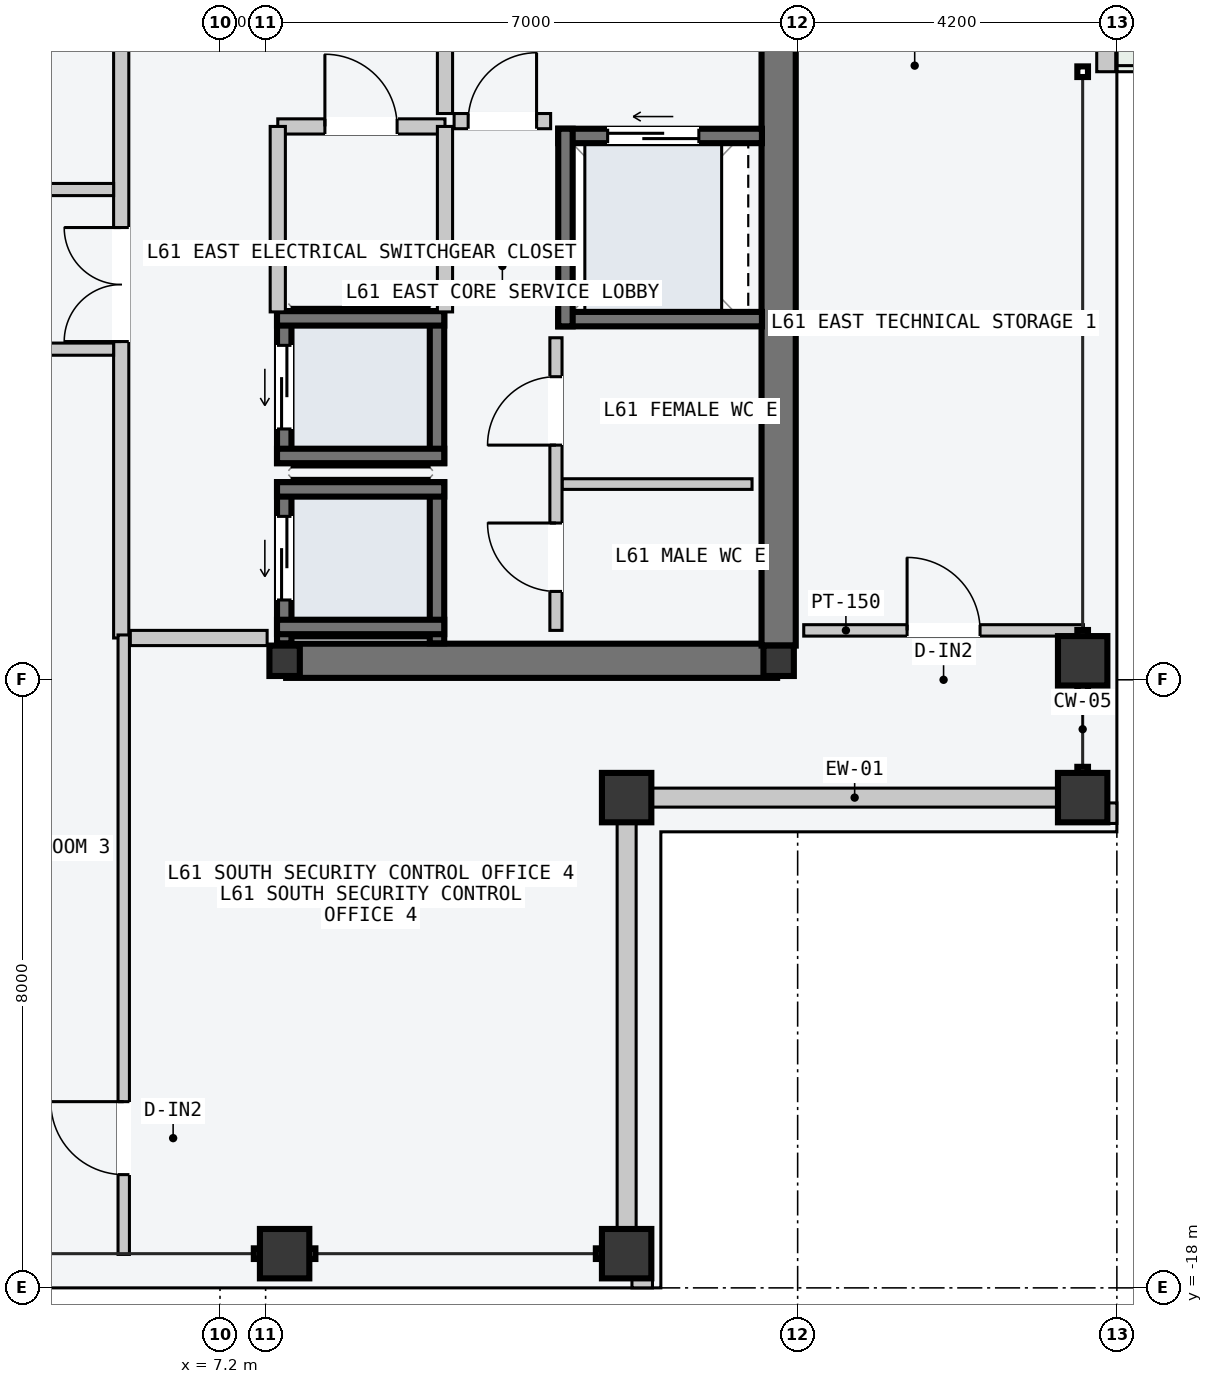
"""IFC4 building model, lengths in metres.
Left out: names, types, materials, properties, quantities, classifications, styles, units other than length and angle.
Written with IfcOpenShell. Run it as: python <this file> out.ifc"""

import sys

from ifc_helpers import new_model, si_unit, direction, frame, frame_2d, origin, origin_2d, place, context, subcontext, project, spatial, rectangle, hollow_rectangle, i_section, extrude, element, fill, save


model = new_model("IFC4")
c1 = context("Model", 3, precision=1e-05, world=origin(), true_north=direction((0.0, 1.0)))
c2 = subcontext(c1, "Body", "Model", "MODEL_VIEW")
j1 = project(units=[si_unit("LENGTHUNIT", "METRE"), si_unit("PLANEANGLEUNIT", "RADIAN")], contexts=[c1])
p1 = place(None, origin())
s1 = spatial("IfcSite", under=j1, at=p1, CompositionType="ELEMENT")
p2 = place(p1, origin())
s2 = spatial("IfcBuilding", under=s1, at=p2, CompositionType="ELEMENT")
p3 = place(p2, frame((0.0, 0.0, 232.8)))
s3 = spatial("IfcBuildingStorey", under=s2, at=p3, CompositionType="ELEMENT", Elevation=232.8)
p4 = place(p3, frame((8.07, -9.75, -0.2), z_axis=(0.0, 0.0, 1.0), x_axis=(1.0, 0.0, 0.0)))
e1 = element("IfcWall", 1, at=p4, inside=s3, PredefinedType="SHEAR", context=c2, shape_type="SweptSolid", body=[
    extrude(rectangle(XDim=6.46, YDim=0.45, at=frame_2d((3.23, 0.0))), origin(), (0.0, 0.0, 1.0), 3.6),
])
p5 = place(p3, frame((14.55, -9.55, -0.2), z_axis=(0.0, 0.0, 1.0), x_axis=(0.0, 1.0, 0.0)))
e2 = element("IfcWall", 2, at=p5, inside=s3, PredefinedType="SHEAR", context=c2, shape_type="SweptSolid", body=[
    extrude(rectangle(XDim=9.35, YDim=0.45, at=frame_2d((4.675, 0.0))), origin(), (0.0, 0.0, 1.0), 3.6),
])
for number, where, z_axis, x_axis in (
    (3, (8.05, -9.75, 0.0), (0.0, 0.0, 1.0), (1.0, 0.0, 0.0)),
    (4, (14.55, -9.75, 0.0), (0.0, 0.0, 1.0), (1.0, 0.0, 0.0)),
):
    element("IfcColumn", number, at=place(p3, frame(where, z_axis=z_axis, x_axis=x_axis)), inside=s3, PredefinedType="COLUMN", context=c2, shape_type="SweptSolid", body=[
        extrude(i_section(OverallWidth=0.4, OverallDepth=0.4, WebThickness=0.013, FlangeThickness=0.021, at=origin_2d()), origin(), (0.0, 0.0, 1.0), 3.6),
    ])
for number, where, z_axis, x_axis in (
    (5, (8.05, -17.55, 0.0), (0.0, 0.0, 1.0), (1.0, 0.0, 0.0)),
    (6, (12.55, -17.55, 0.0), (0.0, 0.0, 1.0), (1.0, 0.0, 0.0)),
    (7, (18.55, -11.55, 0.0), (0.0, 0.0, 1.0), (0.0, 1.0, 0.0)),
    (8, (18.55, -9.75, 0.0), (0.0, 0.0, 1.0), (0.0, 1.0, 0.0)),
    (9, (12.55, -11.55, 0.0), (0.0, 0.0, 1.0), (1.0, 0.0, 0.0)),
):
    element("IfcColumn", number, at=place(p3, frame(where, z_axis=z_axis, x_axis=x_axis)), inside=s3, PredefinedType="COLUMN", context=c2, shape_type="SweptSolid", body=[
        extrude(hollow_rectangle(XDim=0.65, YDim=0.65, WallThickness=0.028, at=origin_2d()), origin(), (0.0, 0.0, 1.0), 3.6),
    ])
p6 = place(p3, frame((18.86, -2.0, 0.0), z_axis=(0.0, 0.0, 1.0), x_axis=(0.0, 1.0, 0.0)))
e10 = element("IfcWall", 10, at=p6, inside=s3, PredefinedType="STANDARD", context=c2, shape_type="SweptSolid", body=[
    extrude(rectangle(XDim=10.8, YDim=0.25, at=frame_2d((5.4, 0.0))), origin(), (0.0, 0.0, 1.0), 3.4),
])
p7 = place(p6, frame((6.6, 0.0, 0.0)))
e11 = element("IfcOpeningElement", 11, at=p7, cuts=e10, PredefinedType="OPENING", context=c2, shape_type="SweptSolid", body=[
    extrude(rectangle(XDim=1.6, YDim=2.2, at=frame_2d((0.8, 1.1))), frame((0.0, 0.135, 0.0), z_axis=(0.0, -1.0, 0.0), x_axis=(1.0, 0.0, 0.0)), (0.0, 0.0, 1.0), 0.27),
])
p8 = place(p6, frame((1.4, 0.0, 0.85)))
e12 = element("IfcOpeningElement", 12, at=p8, cuts=e10, PredefinedType="OPENING", context=c2, shape_type="SweptSolid", body=[
    extrude(rectangle(XDim=1.8, YDim=2.05, at=frame_2d((0.9, 1.025))), frame((0.0, 0.135, 0.0), z_axis=(0.0, -1.0, 0.0), x_axis=(1.0, 0.0, 0.0)), (0.0, 0.0, 1.0), 0.27),
])
for number, where, z_axis, x_axis in (
    (13, (12.885, -11.55, 0.0), (0.0, 0.0, 1.0), (1.0, 0.0, 0.0)),
    (14, (12.55, -17.215, 0.0), (0.0, 0.0, 1.0), (0.0, 1.0, 0.0)),
):
    element("IfcWall", number, at=place(p3, frame(where, z_axis=z_axis, x_axis=x_axis)), inside=s3, PredefinedType="STANDARD", context=c2, shape_type="SweptSolid", body=[
        extrude(rectangle(XDim=5.33, YDim=0.25, at=frame_2d((2.665, 0.0))), origin(), (0.0, 0.0, 1.0), 2.85),
    ])
for number, where, z_axis, x_axis in (
    (15, (12.62, -17.89, 0.0), (0.0, 0.0, 1.0), (1.0, 0.0, 0.0)),
    (16, (18.89, -11.89, 0.0), (0.0, 0.0, 1.0), (0.0, 1.0, 0.0)),
):
    element("IfcWall", number, at=place(p3, frame(where, z_axis=z_axis, x_axis=x_axis)), inside=s3, PredefinedType="PARAPET", context=c2, shape_type="SweptSolid", body=[
        extrude(rectangle(XDim=0.27, YDim=0.22, at=frame_2d((0.135, 0.0))), origin(), (0.0, 0.0, 1.0), 1.2),
    ])
p9 = place(p3, frame((8.045, -9.52, -0.2), z_axis=(0.0, 0.0, 1.0), x_axis=(0.0, 1.0, 0.0)))
e17 = element("IfcWall", 17, at=p9, inside=s3, PredefinedType="SOLIDWALL", context=c2, shape_type="SweptSolid", body=[
    extrude(rectangle(XDim=2.12, YDim=0.19, at=frame_2d((1.06, 0.0))), origin(), (0.0, 0.0, 1.0), 3.6),
])
p10 = place(p9, frame((0.57, 0.0, 0.2)))
e18 = element("IfcOpeningElement", 18, at=p10, cuts=e17, PredefinedType="OPENING", context=c2, shape_type="SweptSolid", body=[
    extrude(rectangle(XDim=1.1, YDim=2.2, at=frame_2d((0.55, 1.1))), frame((0.0, 0.105, 0.0), z_axis=(0.0, -1.0, 0.0), x_axis=(1.0, 0.0, 0.0)), (0.0, 0.0, 1.0), 0.21),
])
p11 = place(p3, frame((10.055, -9.52, -0.2), z_axis=(0.0, 0.0, 1.0), x_axis=(0.0, 1.0, 0.0)))
e19 = element("IfcWall", 19, at=p11, inside=s3, PredefinedType="SOLIDWALL", context=c2, shape_type="SweptSolid", body=[
    extrude(rectangle(XDim=2.12, YDim=0.19, at=frame_2d((1.06, 0.0))), origin(), (0.0, 0.0, 1.0), 3.6),
])
for number, where, z_axis, x_axis in (
    (20, (7.95, -7.495, -0.2), (0.0, 0.0, 1.0), (1.0, 0.0, 0.0)),
    (21, (7.95, -9.305, -0.2), (0.0, 0.0, 1.0), (1.0, 0.0, 0.0)),
):
    element("IfcWall", number, at=place(p3, frame(where, z_axis=z_axis, x_axis=x_axis)), inside=s3, PredefinedType="SOLIDWALL", context=c2, shape_type="SweptSolid", body=[
        extrude(rectangle(XDim=2.2, YDim=0.19, at=frame_2d((1.1, 0.0))), origin(), (0.0, 0.0, 1.0), 3.6),
    ])
p12 = place(p3, frame((8.045, -7.15, -0.2), z_axis=(0.0, 0.0, 1.0), x_axis=(0.0, 1.0, 0.0)))
e22 = element("IfcWall", 22, at=p12, inside=s3, PredefinedType="SOLIDWALL", context=c2, shape_type="SweptSolid", body=[
    extrude(rectangle(XDim=2.0, YDim=0.19, at=frame_2d((1.0, 0.0))), origin(), (0.0, 0.0, 1.0), 3.6),
])
p13 = place(p12, frame((0.45, 0.0, 0.2)))
e23 = element("IfcOpeningElement", 23, at=p13, cuts=e22, PredefinedType="OPENING", context=c2, shape_type="SweptSolid", body=[
    extrude(rectangle(XDim=1.1, YDim=2.2, at=frame_2d((0.55, 1.1))), frame((0.0, 0.105, 0.0), z_axis=(0.0, -1.0, 0.0), x_axis=(1.0, 0.0, 0.0)), (0.0, 0.0, 1.0), 0.21),
])
p14 = place(p3, frame((10.055, -7.15, -0.2), z_axis=(0.0, 0.0, 1.0), x_axis=(0.0, 1.0, 0.0)))
e24 = element("IfcWall", 24, at=p14, inside=s3, PredefinedType="SOLIDWALL", context=c2, shape_type="SweptSolid", body=[
    extrude(rectangle(XDim=2.0, YDim=0.19, at=frame_2d((1.0, 0.0))), origin(), (0.0, 0.0, 1.0), 3.6),
])
for number, where, z_axis, x_axis in (
    (25, (7.95, -5.245, -0.2), (0.0, 0.0, 1.0), (1.0, 0.0, 0.0)),
    (26, (7.95, -7.055, -0.2), (0.0, 0.0, 1.0), (1.0, 0.0, 0.0)),
):
    element("IfcWall", number, at=place(p3, frame(where, z_axis=z_axis, x_axis=x_axis)), inside=s3, PredefinedType="SOLIDWALL", context=c2, shape_type="SweptSolid", body=[
        extrude(rectangle(XDim=2.2, YDim=0.19, at=frame_2d((1.1, 0.0))), origin(), (0.0, 0.0, 1.0), 3.6),
    ])
p15 = place(p3, frame((11.65, -2.845, -0.2), z_axis=(0.0, 0.0, 1.0), x_axis=(1.0, 0.0, 0.0)))
e27 = element("IfcWall", 27, at=p15, inside=s3, PredefinedType="SOLIDWALL", context=c2, shape_type="SweptSolid", body=[
    extrude(rectangle(XDim=2.68, YDim=0.19, at=frame_2d((1.34, 0.0))), origin(), (0.0, 0.0, 1.0), 3.6),
])
p16 = place(p15, frame((0.65, 0.0, 0.2)))
e28 = element("IfcOpeningElement", 28, at=p16, cuts=e27, PredefinedType="OPENING", context=c2, shape_type="SweptSolid", body=[
    extrude(rectangle(XDim=1.2, YDim=2.2, at=frame_2d((0.6, 1.1))), frame((0.0, 0.105, 0.0), z_axis=(0.0, -1.0, 0.0), x_axis=(1.0, 0.0, 0.0)), (0.0, 0.0, 1.0), 0.21),
])
p17 = place(p3, frame((11.65, -5.255, -0.2), z_axis=(0.0, 0.0, 1.0), x_axis=(1.0, 0.0, 0.0)))
e29 = element("IfcWall", 29, at=p17, inside=s3, PredefinedType="SOLIDWALL", context=c2, shape_type="SweptSolid", body=[
    extrude(rectangle(XDim=2.68, YDim=0.19, at=frame_2d((1.34, 0.0))), origin(), (0.0, 0.0, 1.0), 3.6),
])
p18 = place(p3, frame((11.745, -5.35, -0.2), z_axis=(0.0, 0.0, 1.0), x_axis=(0.0, 1.0, 0.0)))
e30 = element("IfcWall", 30, at=p18, inside=s3, PredefinedType="SOLIDWALL", context=c2, shape_type="SweptSolid", body=[
    extrude(rectangle(XDim=2.6, YDim=0.19, at=frame_2d((1.3, 0.0))), origin(), (0.0, 0.0, 1.0), 3.6),
])
p19 = place(p3, frame((5.9, -9.45, 0.0), z_axis=(0.0, 0.0, 1.0), x_axis=(0.0, 1.0, 0.0)))
e31 = element("IfcWall", 31, at=p19, inside=s3, PredefinedType="PARTITIONING", context=c2, shape_type="SweptSolid", body=[
    extrude(rectangle(XDim=10.5, YDim=0.2, at=frame_2d((5.25, 0.0))), origin(), (0.0, 0.0, 1.0), 3.4),
])
p20 = place(p19, frame((3.9, 0.0, 0.0)))
e32 = element("IfcOpeningElement", 32, at=p20, cuts=e31, PredefinedType="OPENING", context=c2, shape_type="SweptSolid", body=[
    extrude(rectangle(XDim=1.5, YDim=2.2, at=frame_2d((0.75, 1.1))), frame((0.0, 0.11, 0.0), z_axis=(0.0, -1.0, 0.0), x_axis=(1.0, 0.0, 0.0)), (0.0, 0.0, 1.0), 0.22),
])
p21 = place(p3, frame((6.02, -9.45, 0.0), z_axis=(0.0, 0.0, 1.0), x_axis=(1.0, 0.0, 0.0)))
e33 = element("IfcWall", 33, at=p21, inside=s3, PredefinedType="PARTITIONING", context=c2, shape_type="SweptSolid", body=[
    extrude(rectangle(XDim=1.8, YDim=0.2, at=frame_2d((0.9, 0.0))), origin(), (0.0, 0.0, 1.0), 3.4),
])
p22 = place(p3, frame((10.16, -2.55, 0.0), z_axis=(0.0, 0.0, 1.0), x_axis=(0.0, 1.0, 0.0)))
e34 = element("IfcWall", 34, at=p22, inside=s3, PredefinedType="PARTITIONING", context=c2, shape_type="SweptSolid", body=[
    extrude(rectangle(XDim=3.8, YDim=0.2, at=frame_2d((1.9, 0.0))), origin(), (0.0, 0.0, 1.0), 3.4),
])
p23 = place(p22, frame((1.3, 0.0, 0.0)))
e35 = element("IfcOpeningElement", 35, at=p23, cuts=e34, PredefinedType="OPENING", context=c2, shape_type="SweptSolid", body=[
    extrude(rectangle(XDim=1.1, YDim=2.15, at=frame_2d((0.55, 1.075))), frame((0.0, 0.11, 0.0), z_axis=(0.0, -1.0, 0.0), x_axis=(1.0, 0.0, 0.0)), (0.0, 0.0, 1.0), 0.22),
])
p24 = place(p3, frame((10.28, -2.65, 0.0), z_axis=(0.0, 0.0, 1.0), x_axis=(1.0, 0.0, 0.0)))
e36 = element("IfcWall", 36, at=p24, inside=s3, PredefinedType="PARTITIONING", context=c2, shape_type="SweptSolid", body=[
    extrude(rectangle(XDim=1.27, YDim=0.2, at=frame_2d((0.635, 0.0))), origin(), (0.0, 0.0, 1.0), 3.4),
])
p25 = place(p24, frame((0.185, 0.0, 0.0)))
e37 = element("IfcOpeningElement", 37, at=p25, cuts=e36, PredefinedType="OPENING", context=c2, shape_type="SweptSolid", body=[
    extrude(rectangle(XDim=0.9, YDim=2.15, at=frame_2d((0.45, 1.075))), frame((0.0, 0.11, 0.0), z_axis=(0.0, -1.0, 0.0), x_axis=(1.0, 0.0, 0.0)), (0.0, 0.0, 1.0), 0.22),
])
p26 = place(p3, frame((7.96, -2.72, 0.0), z_axis=(0.0, 0.0, 1.0), x_axis=(1.0, 0.0, 0.0)))
e38 = element("IfcWall", 38, at=p26, inside=s3, PredefinedType="PARTITIONING", context=c2, shape_type="SweptSolid", body=[
    extrude(rectangle(XDim=2.2, YDim=0.2, at=frame_2d((1.1, 0.0))), origin(), (0.0, 0.0, 1.0), 3.4),
])
p27 = place(p26, frame((0.62, 0.0, 0.0)))
e39 = element("IfcOpeningElement", 39, at=p27, cuts=e38, PredefinedType="OPENING", context=c2, shape_type="SweptSolid", body=[
    extrude(rectangle(XDim=0.95, YDim=2.1, at=frame_2d((0.475, 1.05))), frame((0.0, 0.11, 0.0), z_axis=(0.0, -1.0, 0.0), x_axis=(1.0, 0.0, 0.0)), (0.0, 0.0, 1.0), 0.22),
])
for number, where, z_axis, x_axis in (
    (40, (7.96, -5.16, 0.0), (0.0, 0.0, 1.0), (0.0, 1.0, 0.0)),
    (41, (10.16, -5.16, 0.0), (0.0, 0.0, 1.0), (0.0, 1.0, 0.0)),
):
    element("IfcWall", number, at=place(p3, frame(where, z_axis=z_axis, x_axis=x_axis)), inside=s3, PredefinedType="PARTITIONING", context=c2, shape_type="SweptSolid", body=[
        extrude(rectangle(XDim=2.44, YDim=0.2, at=frame_2d((1.22, 0.0))), origin(), (0.0, 0.0, 1.0), 3.4),
    ])
p28 = place(p3, frame((11.7, -7.425, 0.0), z_axis=(0.0, 0.0, 1.0), x_axis=(1.0, 0.0, 0.0)))
e42 = element("IfcWall", 42, at=p28, inside=s3, PredefinedType="PARTITIONING", context=c2, shape_type="SweptSolid", body=[
    extrude(rectangle(XDim=2.5, YDim=0.14, at=frame_2d((1.25, 0.0))), origin(), (0.0, 0.0, 1.0), 3.4),
])
p29 = place(p3, frame((11.62, -9.35, 0.0), z_axis=(0.0, 0.0, 1.0), x_axis=(0.0, 1.0, 0.0)))
e43 = element("IfcWall", 43, at=p29, inside=s3, PredefinedType="PARTITIONING", context=c2, shape_type="SweptSolid", body=[
    extrude(rectangle(XDim=3.85, YDim=0.16, at=frame_2d((1.925, 0.0))), origin(), (0.0, 0.0, 1.0), 3.4),
])
p30 = place(p29, frame((0.512, 0.0, 0.0)))
e44 = element("IfcOpeningElement", 44, at=p30, cuts=e43, PredefinedType="OPENING", context=c2, shape_type="SweptSolid", body=[
    extrude(rectangle(XDim=0.9, YDim=2.15, at=frame_2d((0.45, 1.075))), frame((0.0, 0.09, 0.0), z_axis=(0.0, -1.0, 0.0), x_axis=(1.0, 0.0, 0.0)), (0.0, 0.0, 1.0), 0.18),
])
p31 = place(p29, frame((2.438, 0.0, 0.0)))
e45 = element("IfcOpeningElement", 45, at=p31, cuts=e43, PredefinedType="OPENING", context=c2, shape_type="SweptSolid", body=[
    extrude(rectangle(XDim=0.9, YDim=2.15, at=frame_2d((0.45, 1.075))), frame((0.0, 0.09, 0.0), z_axis=(0.0, -1.0, 0.0), x_axis=(1.0, 0.0, 0.0)), (0.0, 0.0, 1.0), 0.18),
])
for number, where, z_axis, x_axis in (
    (46, (-0.49, -3.55, 0.0), (0.0, 0.0, 1.0), (1.0, 0.0, 0.0)),
    (47, (-0.49, -5.65, 0.0), (0.0, 0.0, 1.0), (1.0, 0.0, 0.0)),
):
    element("IfcWall", number, at=place(p3, frame(where, z_axis=z_axis, x_axis=x_axis)), inside=s3, PredefinedType="PARTITIONING", context=c2, shape_type="SweptSolid", body=[
        extrude(rectangle(XDim=6.29, YDim=0.16, at=frame_2d((3.145, 0.0))), origin(), (0.0, 0.0, 1.0), 3.4),
    ])
p32 = place(p3, frame((5.933, -17.56, 0.0), z_axis=(0.0, 0.0, 1.0), x_axis=(0.0, 1.0, 0.0)))
e48 = element("IfcWall", 48, at=p32, inside=s3, PredefinedType="PARTITIONING", context=c2, shape_type="SweptSolid", body=[
    extrude(rectangle(XDim=8.15, YDim=0.15, at=frame_2d((4.075, 0.0))), origin(), (0.0, 0.0, 1.0), 3.4),
])
p33 = place(p32, frame((1.05, 0.0, 0.0)))
e49 = element("IfcOpeningElement", 49, at=p33, cuts=e48, PredefinedType="OPENING", context=c2, shape_type="SweptSolid", body=[
    extrude(rectangle(XDim=0.96, YDim=2.18, at=frame_2d((0.48, 1.09))), frame((0.0, 0.085, 0.0), z_axis=(0.0, -1.0, 0.0), x_axis=(1.0, 0.0, 0.0)), (0.0, 0.0, 1.0), 0.17),
])
p34 = place(p3, frame((14.88, -9.35, 0.0), z_axis=(0.0, 0.0, 1.0), x_axis=(1.0, 0.0, 0.0)))
e50 = element("IfcWall", 50, at=p34, inside=s3, PredefinedType="PARTITIONING", context=c2, shape_type="SweptSolid", body=[
    extrude(rectangle(XDim=3.68, YDim=0.15, at=frame_2d((1.84, 0.0))), origin(), (0.0, 0.0, 1.0), 3.4),
])
p35 = place(p34, frame((1.36, 0.0, 0.0)))
e51 = element("IfcOpeningElement", 51, at=p35, cuts=e50, PredefinedType="OPENING", context=c2, shape_type="SweptSolid", body=[
    extrude(rectangle(XDim=0.96, YDim=2.18, at=frame_2d((0.48, 1.09))), frame((0.0, 0.085, 0.0), z_axis=(0.0, -1.0, 0.0), x_axis=(1.0, 0.0, 0.0)), (0.0, 0.0, 1.0), 0.17),
])
p36 = place(p10, origin())
e52 = element("IfcDoor", 52, at=p36, inside=s3, OperationType="SLIDING_TO_LEFT", PredefinedType="DOOR", context=c2, shape_type="SweptSolid", body=[
    extrude(rectangle(XDim=1.1, YDim=2.2, at=frame_2d((0.55, 1.1))), frame((0.0, 0.025, 0.0), z_axis=(0.0, -1.0, 0.0), x_axis=(1.0, 0.0, 0.0)), (0.0, 0.0, 1.0), 0.05),
])
fill(e18, e52)
p37 = place(p13, origin())
e53 = element("IfcDoor", 53, at=p37, inside=s3, OperationType="SLIDING_TO_LEFT", PredefinedType="DOOR", context=c2, shape_type="SweptSolid", body=[
    extrude(rectangle(XDim=1.1, YDim=2.2, at=frame_2d((0.55, 1.1))), frame((0.0, 0.025, 0.0), z_axis=(0.0, -1.0, 0.0), x_axis=(1.0, 0.0, 0.0)), (0.0, 0.0, 1.0), 0.05),
])
fill(e23, e53)
p38 = place(p16, origin())
e54 = element("IfcDoor", 54, at=p38, inside=s3, OperationType="SLIDING_TO_LEFT", PredefinedType="DOOR", context=c2, shape_type="SweptSolid", body=[
    extrude(rectangle(XDim=1.2, YDim=2.2, at=frame_2d((0.6, 1.1))), frame((0.0, 0.025, 0.0), z_axis=(0.0, -1.0, 0.0), x_axis=(1.0, 0.0, 0.0)), (0.0, 0.0, 1.0), 0.05),
])
fill(e28, e54)
p39 = place(p20, origin())
e55 = element("IfcDoor", 55, at=p39, inside=s3, OperationType="DOUBLE_DOOR_SINGLE_SWING", PredefinedType="DOOR", context=c2, shape_type="SweptSolid", body=[
    extrude(rectangle(XDim=1.5, YDim=2.2, at=frame_2d((0.75, 1.1))), frame((0.0, 0.025, 0.0), z_axis=(0.0, -1.0, 0.0), x_axis=(1.0, 0.0, 0.0)), (0.0, 0.0, 1.0), 0.05),
])
fill(e32, e55)
p40 = place(p25, origin())
e56 = element("IfcDoor", 56, at=p40, inside=s3, OperationType="SINGLE_SWING_RIGHT", PredefinedType="DOOR", context=c2, shape_type="SweptSolid", body=[
    extrude(rectangle(XDim=0.9, YDim=2.15, at=frame_2d((0.45, 1.075))), frame((0.0, 0.025, 0.0), z_axis=(0.0, -1.0, 0.0), x_axis=(1.0, 0.0, 0.0)), (0.0, 0.0, 1.0), 0.05),
])
fill(e37, e56)
p41 = place(p27, origin())
e57 = element("IfcDoor", 57, at=p41, inside=s3, OperationType="SINGLE_SWING_LEFT", PredefinedType="DOOR", context=c2, shape_type="SweptSolid", body=[
    extrude(rectangle(XDim=0.95, YDim=2.1, at=frame_2d((0.475, 1.05))), frame((0.0, 0.025, 0.0), z_axis=(0.0, -1.0, 0.0), x_axis=(1.0, 0.0, 0.0)), (0.0, 0.0, 1.0), 0.05),
])
fill(e39, e57)
p42 = place(p30, origin())
e58 = element("IfcDoor", 58, at=p42, inside=s3, OperationType="SINGLE_SWING_RIGHT", PredefinedType="DOOR", context=c2, shape_type="SweptSolid", body=[
    extrude(rectangle(XDim=0.9, YDim=2.15, at=frame_2d((0.45, 1.075))), frame((0.0, 0.025, 0.0), z_axis=(0.0, -1.0, 0.0), x_axis=(1.0, 0.0, 0.0)), (0.0, 0.0, 1.0), 0.05),
])
fill(e44, e58)
p43 = place(p31, origin())
e59 = element("IfcDoor", 59, at=p43, inside=s3, OperationType="SINGLE_SWING_LEFT", PredefinedType="DOOR", context=c2, shape_type="SweptSolid", body=[
    extrude(rectangle(XDim=0.9, YDim=2.15, at=frame_2d((0.45, 1.075))), frame((0.0, 0.025, 0.0), z_axis=(0.0, -1.0, 0.0), x_axis=(1.0, 0.0, 0.0)), (0.0, 0.0, 1.0), 0.05),
])
fill(e45, e59)
p44 = place(p33, origin())
e60 = element("IfcDoor", 60, at=p44, inside=s3, OperationType="SINGLE_SWING_RIGHT", PredefinedType="DOOR", context=c2, shape_type="SweptSolid", body=[
    extrude(rectangle(XDim=0.96, YDim=2.18, at=frame_2d((0.48, 1.09))), frame((0.0, 0.025, 0.0), z_axis=(0.0, -1.0, 0.0), x_axis=(1.0, 0.0, 0.0)), (0.0, 0.0, 1.0), 0.05),
])
fill(e49, e60)
p45 = place(p35, origin())
e61 = element("IfcDoor", 61, at=p45, inside=s3, OperationType="SINGLE_SWING_LEFT", PredefinedType="DOOR", context=c2, shape_type="SweptSolid", body=[
    extrude(rectangle(XDim=0.96, YDim=2.18, at=frame_2d((0.48, 1.09))), frame((0.0, 0.025, 0.0), z_axis=(0.0, -1.0, 0.0), x_axis=(1.0, 0.0, 0.0)), (0.0, 0.0, 1.0), 0.05),
])
fill(e51, e61)
save(model, sys.argv[1])
